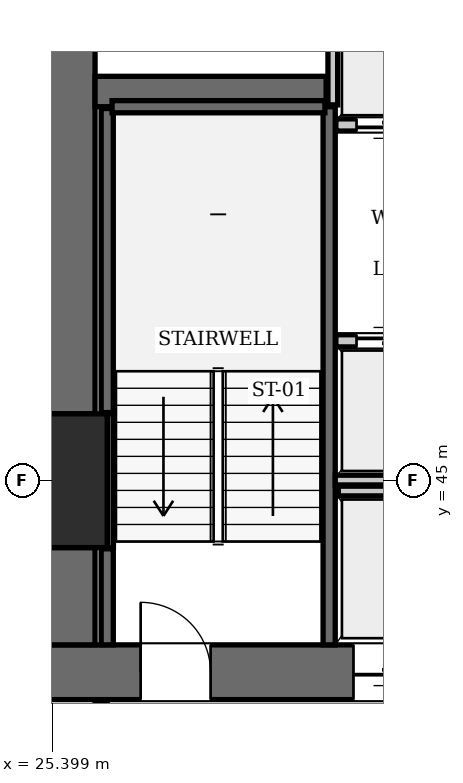
"""IFC4 building model, lengths in metres.
Left out: names, types, materials, properties, quantities, classifications, styles, units other than length and angle.
Written with IfcOpenShell. Run it as: python <this file> out.ifc"""

import sys

from ifc_helpers import new_model, si_unit, direction, frame, frame_2d, origin, origin_2d, place, context, subcontext, project, spatial, rectangle, extrude, element, fill, save


model = new_model("IFC4")
c1 = context("Model", 3, precision=1e-05, world=origin(), true_north=direction((0.0, 1.0)))
c2 = subcontext(c1, "Body", "Model", "MODEL_VIEW")
j1 = project(units=[si_unit("LENGTHUNIT", "METRE"), si_unit("PLANEANGLEUNIT", "RADIAN")], contexts=[c1])
p1 = place(None, origin())
s1 = spatial("IfcSite", under=j1, at=p1, CompositionType="ELEMENT")
p2 = place(p1, origin())
s2 = spatial("IfcBuilding", under=s1, at=p2, CompositionType="ELEMENT")
p3 = place(p2, frame((0.0, 0.0, 46.2)))
s3 = spatial("IfcBuildingStorey", under=s2, at=p3, CompositionType="ELEMENT", Elevation=46.2)
p4 = place(p3, frame((25.2, 45.0, 0.0), z_axis=(0.0, 0.0, 1.0), x_axis=(1.0, 0.0, 0.0)))
e1 = element("IfcColumn", 1, at=p4, inside=s3, PredefinedType="COLUMN", context=c2, shape_type="SweptSolid", body=[
    extrude(rectangle(XDim=2.2, YDim=2.2, at=origin_2d()), origin(), (0.0, 0.0, 1.0), 3.85),
])
p5 = place(p3, frame((25.2, 41.85, 0.0), z_axis=(0.0, 0.0, 1.0), x_axis=(1.0, 0.0, 0.0)))
e2 = element("IfcWall", 2, at=p5, inside=s3, PredefinedType="SHEAR", context=c2, shape_type="SweptSolid", body=[
    extrude(rectangle(XDim=6.8, YDim=0.9, at=frame_2d((3.4, 0.0))), origin(), (0.0, 0.0, 1.0), 3.85),
])
p6 = place(p5, frame((1.65, 0.0, 0.0)))
e3 = element("IfcOpeningElement", 3, at=p6, cuts=e2, PredefinedType="OPENING", context=c2, shape_type="SweptSolid", body=[
    extrude(rectangle(XDim=1.15, YDim=2.15, at=frame_2d((0.575, 1.075))), frame((0.0, 0.46, 0.0), z_axis=(0.0, -1.0, 0.0), x_axis=(1.0, 0.0, 0.0)), (0.0, 0.0, 1.0), 0.92),
])
p7 = place(p5, frame((5.15, 0.0, 0.0)))
e4 = element("IfcOpeningElement", 4, at=p7, cuts=e2, PredefinedType="OPENING", context=c2, shape_type="SweptSolid", body=[
    extrude(rectangle(XDim=1.1, YDim=2.2, at=frame_2d((0.55, 1.1))), frame((0.0, 0.46, 0.0), z_axis=(0.0, -1.0, 0.0), x_axis=(1.0, 0.0, 0.0)), (0.0, 0.0, 1.0), 0.92),
])
p8 = place(p3, frame((25.65, 42.3, 0.0), z_axis=(0.0, 0.0, 1.0), x_axis=(0.0, 1.0, 0.0)))
e5 = element("IfcWall", 5, at=p8, inside=s3, PredefinedType="SHEAR", context=c2, shape_type="SweptSolid", body=[
    extrude(rectangle(XDim=1.6, YDim=0.9, at=frame_2d((0.8, 0.0))), origin(), (0.0, 0.0, 1.0), 3.85),
])
p9 = place(p3, frame((25.65, 46.1, 0.0), z_axis=(0.0, 0.0, 1.0), x_axis=(0.0, 1.0, 0.0)))
e6 = element("IfcWall", 6, at=p9, inside=s3, PredefinedType="SHEAR", context=c2, shape_type="SweptSolid", body=[
    extrude(rectangle(XDim=7.0, YDim=0.9, at=frame_2d((3.5, 0.0))), origin(), (0.0, 0.0, 1.0), 3.85),
])
p10 = place(p3, frame((26.1, 51.4, 0.0), z_axis=(0.0, 0.0, 1.0), x_axis=(1.0, 0.0, 0.0)))
e7 = element("IfcWall", 7, at=p10, inside=s3, PredefinedType="SHEAR", context=c2, shape_type="SweptSolid", body=[
    extrude(rectangle(XDim=3.8, YDim=0.5, at=frame_2d((1.9, 0.0))), origin(), (0.0, 0.0, 1.0), 3.85),
])
p11 = place(p3, frame((29.95, 42.3, 0.0), z_axis=(0.0, 0.0, 1.0), x_axis=(0.0, 1.0, 0.0)))
e8 = element("IfcWall", 8, at=p11, inside=s3, PredefinedType="SOLIDWALL", context=c2, shape_type="SweptSolid", body=[
    extrude(rectangle(XDim=8.85, YDim=0.2, at=frame_2d((4.425, 0.0))), origin(), (0.0, 0.0, 1.0), 3.61),
])
p12 = place(p3, frame((26.3, 42.3, 0.0), z_axis=(0.0, 0.0, 1.0), x_axis=(0.0, 1.0, 0.0)))
e9 = element("IfcWall", 9, at=p12, inside=s3, PredefinedType="SOLIDWALL", context=c2, shape_type="SweptSolid", body=[
    extrude(rectangle(XDim=1.58, YDim=0.2, at=frame_2d((0.79, 0.0))), origin(), (0.0, 0.0, 1.0), 3.61),
])
p13 = place(p3, frame((26.3, 46.12, 0.0), z_axis=(0.0, 0.0, 1.0), x_axis=(0.0, 1.0, 0.0)))
e10 = element("IfcWall", 10, at=p13, inside=s3, PredefinedType="SOLIDWALL", context=c2, shape_type="SweptSolid", body=[
    extrude(rectangle(XDim=5.0, YDim=0.2, at=frame_2d((2.5, 0.0))), origin(), (0.0, 0.0, 1.0), 3.61),
])
p14 = place(p3, frame((26.38, 51.15, 0.0), z_axis=(0.0, 0.0, 1.0), x_axis=(1.0, 0.0, 0.0)))
e11 = element("IfcWall", 11, at=p14, inside=s3, PredefinedType="SOLIDWALL", context=c2, shape_type="SweptSolid", body=[
    extrude(rectangle(XDim=3.5, YDim=0.2, at=frame_2d((1.75, 0.0))), origin(), (0.0, 0.0, 1.0), 3.61),
])
p15 = place(p3, frame((26.352, 43.9, 0.0), z_axis=(0.0, 0.0, 1.0), x_axis=(0.0, 1.0, 0.0)))
e12 = element("IfcWall", 12, at=p15, inside=s3, PredefinedType="SOLIDWALL", context=c2, shape_type="SweptSolid", body=[
    extrude(rectangle(XDim=2.2, YDim=0.1, at=frame_2d((1.1, 0.0))), origin(), (0.0, 0.0, 1.0), 3.61),
])
p16 = place(p3, frame((30.06, 47.3, 0.0), z_axis=(0.0, 0.0, 1.0), x_axis=(1.0, 0.0, 0.0)))
e13 = element("IfcWall", 13, at=p16, inside=s3, PredefinedType="SOLIDWALL", context=c2, shape_type="SweptSolid", body=[
    extrude(rectangle(XDim=1.68, YDim=0.2, at=frame_2d((0.84, 0.0))), origin(), (0.0, 0.0, 1.0), 3.61),
])
p17 = place(p16, frame((0.34, 0.0, 0.0)))
e14 = element("IfcOpeningElement", 14, at=p17, cuts=e13, PredefinedType="OPENING", context=c2, shape_type="SweptSolid", body=[
    extrude(rectangle(XDim=1.0, YDim=2.15, at=frame_2d((0.5, 1.075))), frame((0.0, 0.11, 0.0), z_axis=(0.0, -1.0, 0.0), x_axis=(1.0, 0.0, 0.0)), (0.0, 0.0, 1.0), 0.22),
])
p18 = place(p3, frame((30.06, 50.85, 0.0), z_axis=(0.0, 0.0, 1.0), x_axis=(1.0, 0.0, 0.0)))
e15 = element("IfcWall", 15, at=p18, inside=s3, PredefinedType="SOLIDWALL", context=c2, shape_type="SweptSolid", body=[
    extrude(rectangle(XDim=1.68, YDim=0.2, at=frame_2d((0.84, 0.0))), origin(), (0.0, 0.0, 1.0), 3.61),
])
p19 = place(p18, frame((0.34, 0.0, 0.0)))
e16 = element("IfcOpeningElement", 16, at=p19, cuts=e15, PredefinedType="OPENING", context=c2, shape_type="SweptSolid", body=[
    extrude(rectangle(XDim=1.0, YDim=2.15, at=frame_2d((0.5, 1.075))), frame((0.0, 0.11, 0.0), z_axis=(0.0, -1.0, 0.0), x_axis=(1.0, 0.0, 0.0)), (0.0, 0.0, 1.0), 0.22),
])
p20 = place(p3, frame((30.1, 44.83, 0.0), z_axis=(0.0, 0.0, 1.0), x_axis=(1.0, 0.0, 0.0)))
e17 = element("IfcWall", 17, at=p20, inside=s3, PredefinedType="SOLIDWALL", context=c2, shape_type="SweptSolid", body=[
    extrude(rectangle(XDim=1.6, YDim=0.16, at=frame_2d((0.8, 0.0))), origin(), (0.0, 0.0, 1.0), 3.61),
])
p21 = place(p3, frame((30.05, 45.01, 0.0), z_axis=(0.0, 0.0, 1.0), x_axis=(1.0, 0.0, 0.0)))
e18 = element("IfcWall", 18, at=p21, inside=s3, PredefinedType="SOLIDWALL", context=c2, shape_type="SweptSolid", body=[
    extrude(rectangle(XDim=3.45, YDim=0.16, at=frame_2d((1.725, 0.0))), origin(), (0.0, 0.0, 1.0), 3.61),
])
p22 = place(p3, frame((30.01, 51.18, 0.0), z_axis=(0.0, 0.0, 1.0), x_axis=(0.0, 1.0, 0.0)))
e19 = element("IfcWall", 19, at=p22, inside=s3, PredefinedType="SOLIDWALL", context=c2, shape_type="SweptSolid", body=[
    extrude(rectangle(XDim=1.92, YDim=0.16, at=frame_2d((0.96, 0.0))), origin(), (0.0, 0.0, 1.0), 3.61),
])
p23 = place(p3, frame((26.2, 38.31, 0.0), z_axis=(0.0, 0.0, 1.0), x_axis=(0.0, 1.0, 0.0)))
e20 = element("IfcWall", 20, at=p23, inside=s3, PredefinedType="PARTITIONING", context=c2, shape_type="SweptSolid", body=[
    extrude(rectangle(XDim=3.07, YDim=0.2, at=frame_2d((1.535, 0.0))), origin(), (0.0, 0.0, 1.0), 3.61),
])
p24 = place(p6, origin())
e21 = element("IfcDoor", 21, at=p24, inside=s3, OperationType="SINGLE_SWING_LEFT", PredefinedType="DOOR", context=c2, shape_type="SweptSolid", body=[
    extrude(rectangle(XDim=1.15, YDim=2.15, at=frame_2d((0.575, 1.075))), frame((0.0, 0.025, 0.0), z_axis=(0.0, -1.0, 0.0), x_axis=(1.0, 0.0, 0.0)), (0.0, 0.0, 1.0), 0.05),
])
fill(e3, e21)
p25 = place(p17, origin())
e22 = element("IfcDoor", 22, at=p25, inside=s3, OperationType="SLIDING_TO_LEFT", PredefinedType="DOOR", context=c2, shape_type="SweptSolid", body=[
    extrude(rectangle(XDim=1.0, YDim=2.15, at=frame_2d((0.5, 1.075))), frame((0.0, 0.025, 0.0), z_axis=(0.0, -1.0, 0.0), x_axis=(1.0, 0.0, 0.0)), (0.0, 0.0, 1.0), 0.05),
])
fill(e14, e22)
p26 = place(p19, frame((1.0, 0.0, 0.0), z_axis=(0.0, 0.0, 1.0), x_axis=(-1.0, 0.0, 0.0)))
e23 = element("IfcDoor", 23, at=p26, inside=s3, OperationType="SLIDING_TO_LEFT", PredefinedType="DOOR", context=c2, shape_type="SweptSolid", body=[
    extrude(rectangle(XDim=1.0, YDim=2.15, at=frame_2d((0.5, 1.075))), frame((0.0, 0.025, 0.0), z_axis=(0.0, -1.0, 0.0), x_axis=(1.0, 0.0, 0.0)), (0.0, 0.0, 1.0), 0.05),
])
fill(e16, e23)
p27 = place(p7, frame((1.1, 0.0, 0.0), z_axis=(0.0, 0.0, 1.0), x_axis=(-1.0, 0.0, 0.0)))
e24 = element("IfcDoor", 24, at=p27, inside=s3, OperationType="SLIDING_TO_LEFT", PredefinedType="DOOR", context=c2, shape_type="SweptSolid", body=[
    extrude(rectangle(XDim=1.1, YDim=2.2, at=frame_2d((0.55, 1.1))), frame((0.0, 0.025, 0.0), z_axis=(0.0, -1.0, 0.0), x_axis=(1.0, 0.0, 0.0)), (0.0, 0.0, 1.0), 0.05),
])
fill(e4, e24)
save(model, sys.argv[1])
